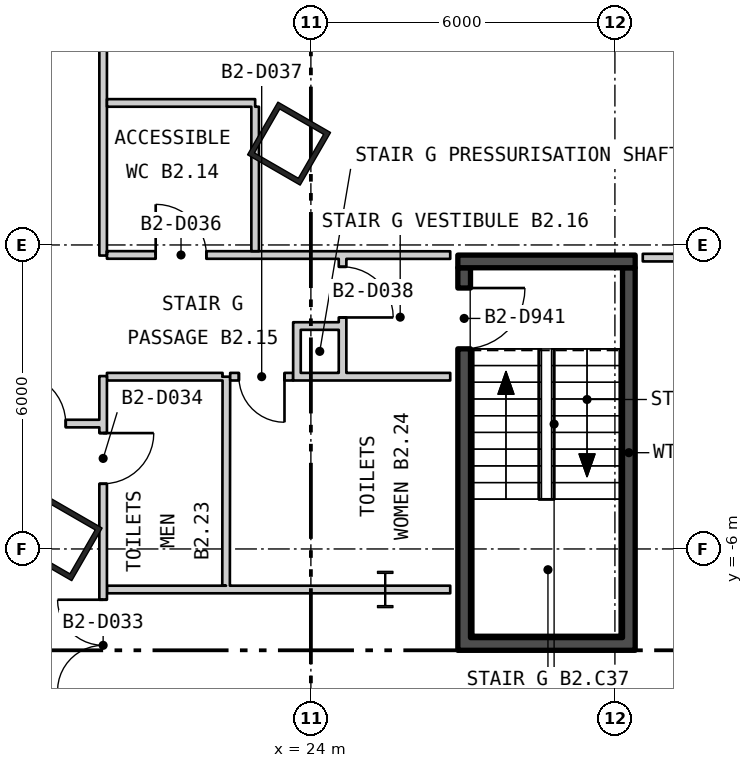
"""IFC4 building model, lengths in metres.
Left out: names, types, materials, properties, quantities, classifications, styles, units other than length and angle.
Written with IfcOpenShell. Run it as: python <this file> out.ifc"""

import sys

from ifc_helpers import new_model, si_unit, direction, frame, frame_2d, origin, origin_2d, place, context, subcontext, project, spatial, rectangle, hollow_rectangle, i_section, extrude, element, fill, save


model = new_model("IFC4")
c1 = context("Model", 3, precision=1e-05, world=origin(), true_north=direction((0.0, 1.0)))
c2 = subcontext(c1, "Body", "Model", "MODEL_VIEW")
j1 = project(units=[si_unit("LENGTHUNIT", "METRE"), si_unit("PLANEANGLEUNIT", "RADIAN")], contexts=[c1])
p1 = place(None, origin())
s1 = spatial("IfcSite", under=j1, at=p1, CompositionType="ELEMENT")
p2 = place(p1, origin())
s2 = spatial("IfcBuilding", under=s1, at=p2, CompositionType="ELEMENT")
p3 = place(p2, frame((0.0, 0.0, -11.4)))
s3 = spatial("IfcBuildingStorey", under=s2, at=p3, CompositionType="ELEMENT", Elevation=-11.4)
for number, where, z_axis, x_axis in (
    (1, (19.061, -5.807, 0.0), (0.0, 0.0, 1.0), (0.5, 0.866, 0.0)),
    (2, (23.569, 2.0, 0.0), (0.0, 0.0, 1.0), (0.5, 0.866, 0.0)),
):
    element("IfcColumn", number, at=place(p3, frame(where, z_axis=z_axis, x_axis=x_axis)), inside=s3, PredefinedType="COLUMN", context=c2, shape_type="SweptSolid", body=[
        extrude(hollow_rectangle(XDim=1.2, YDim=1.2, WallThickness=0.1, at=origin_2d()), origin(), (0.0, 0.0, 1.0), 5.7),
    ])
p4 = place(p3, frame((25.467, -6.8, 0.0), z_axis=(0.0, 0.0, 1.0), x_axis=(1.0, 0.0, 0.0)))
e3 = element("IfcColumn", 3, at=p4, inside=s3, PredefinedType="COLUMN", context=c2, shape_type="SweptSolid", body=[
    extrude(i_section(OverallWidth=0.304, OverallDepth=0.716, WebThickness=0.021, FlangeThickness=0.04, at=origin_2d()), origin(), (0.0, 0.0, 1.0), 5.7),
])
p5 = place(p3, frame((27.025, -7.75, 0.0), z_axis=(0.0, 0.0, 1.0), x_axis=(0.0, 1.0, 0.0)))
e4 = element("IfcWall", 4, at=p5, inside=s3, PredefinedType="SHEAR", context=c2, shape_type="SweptSolid", body=[
    extrude(rectangle(XDim=7.3, YDim=0.25, at=frame_2d((3.65, 0.0))), origin(), (0.0, 0.0, 1.0), 5.25),
])
p6 = place(p5, frame((5.7, 0.0, 0.0)))
e5 = element("IfcOpeningElement", 5, at=p6, cuts=e4, PredefinedType="OPENING", context=c2, shape_type="SweptSolid", body=[
    extrude(rectangle(XDim=1.2, YDim=2.1, at=frame_2d((0.6, 1.05))), frame((0.0, 0.135, 0.0), z_axis=(0.0, -1.0, 0.0), x_axis=(1.0, 0.0, 0.0)), (0.0, 0.0, 1.0), 0.27),
])
p7 = place(p3, frame((30.275, -7.75, 0.0), z_axis=(0.0, 0.0, 1.0), x_axis=(0.0, 1.0, 0.0)))
e6 = element("IfcWall", 6, at=p7, inside=s3, PredefinedType="SHEAR", context=c2, shape_type="SweptSolid", body=[
    extrude(rectangle(XDim=7.3, YDim=0.25, at=frame_2d((3.65, 0.0))), origin(), (0.0, 0.0, 1.0), 5.25),
])
for number, where, z_axis, x_axis in (
    (7, (26.9, -7.875, 0.0), (0.0, 0.0, 1.0), (1.0, 0.0, 0.0)),
    (8, (26.9, -0.325, 0.0), (0.0, 0.0, 1.0), (1.0, 0.0, 0.0)),
):
    element("IfcWall", number, at=place(p3, frame(where, z_axis=z_axis, x_axis=x_axis)), inside=s3, PredefinedType="SHEAR", context=c2, shape_type="SweptSolid", body=[
        extrude(rectangle(XDim=3.5, YDim=0.25, at=frame_2d((1.75, 0.0))), origin(), (0.0, 0.0, 1.0), 5.25),
    ])
p8 = place(p3, frame((17.5, -3.525, 0.0), z_axis=(0.0, 0.0, 1.0), x_axis=(1.0, 0.0, 0.0)))
e9 = element("IfcWall", 9, at=p8, inside=s3, PredefinedType="PARTITIONING", context=c2, shape_type="SweptSolid", body=[
    extrude(rectangle(XDim=2.325, YDim=0.15, at=frame_2d((1.163, 0.0))), origin(), (0.0, 0.0, 1.0), 5.25),
])
p9 = place(p8, frame((0.662, 0.0, 0.0)))
e10 = element("IfcOpeningElement", 10, at=p9, cuts=e9, PredefinedType="OPENING", context=c2, shape_type="SweptSolid", body=[
    extrude(rectangle(XDim=1.0, YDim=2.1, at=frame_2d((0.5, 1.05))), frame((0.0, 0.085, 0.0), z_axis=(0.0, -1.0, 0.0), x_axis=(1.0, 0.0, 0.0)), (0.0, 0.0, 1.0), 0.17),
])
p10 = place(p3, frame((19.9, -23.775, 0.0), z_axis=(0.0, 0.0, 1.0), x_axis=(0.0, 1.0, 0.0)))
e11 = element("IfcWall", 11, at=p10, inside=s3, PredefinedType="PARTITIONING", context=c2, shape_type="SweptSolid", body=[
    extrude(rectangle(XDim=21.187, YDim=0.15, at=frame_2d((10.594, 0.0))), origin(), (0.0, 0.0, 1.0), 5.25),
])
p11 = place(p10, frame((0.275, 0.0, 0.0)))
e12 = element("IfcOpeningElement", 12, at=p11, cuts=e11, PredefinedType="OPENING", context=c2, shape_type="SweptSolid", body=[
    extrude(rectangle(XDim=1.0, YDim=2.1, at=frame_2d((0.5, 1.05))), frame((0.0, 0.085, 0.0), z_axis=(0.0, -1.0, 0.0), x_axis=(1.0, 0.0, 0.0)), (0.0, 0.0, 1.0), 0.17),
])
p12 = place(p10, frame((4.942, 0.0, 0.0)))
e13 = element("IfcOpeningElement", 13, at=p12, cuts=e11, PredefinedType="OPENING", context=c2, shape_type="SweptSolid", body=[
    extrude(rectangle(XDim=1.8, YDim=2.1, at=frame_2d((0.9, 1.05))), frame((0.0, 0.085, 0.0), z_axis=(0.0, -1.0, 0.0), x_axis=(1.0, 0.0, 0.0)), (0.0, 0.0, 1.0), 0.17),
])
p13 = place(p10, frame((9.886, 0.0, 0.0)))
e14 = element("IfcOpeningElement", 14, at=p13, cuts=e11, PredefinedType="OPENING", context=c2, shape_type="SweptSolid", body=[
    extrude(rectangle(XDim=1.8, YDim=2.1, at=frame_2d((0.9, 1.05))), frame((0.0, 0.085, 0.0), z_axis=(0.0, -1.0, 0.0), x_axis=(1.0, 0.0, 0.0)), (0.0, 0.0, 1.0), 0.17),
])
p14 = place(p10, frame((14.973, 0.0, 0.0)))
e15 = element("IfcOpeningElement", 15, at=p14, cuts=e11, PredefinedType="OPENING", context=c2, shape_type="SweptSolid", body=[
    extrude(rectangle(XDim=1.8, YDim=2.1, at=frame_2d((0.9, 1.05))), frame((0.0, 0.085, 0.0), z_axis=(0.0, -1.0, 0.0), x_axis=(1.0, 0.0, 0.0)), (0.0, 0.0, 1.0), 0.17),
])
p15 = place(p10, frame((19.062, 0.0, 0.0)))
e16 = element("IfcOpeningElement", 16, at=p15, cuts=e11, PredefinedType="OPENING", context=c2, shape_type="SweptSolid", body=[
    extrude(rectangle(XDim=1.0, YDim=2.1, at=frame_2d((0.5, 1.05))), frame((0.0, 0.085, 0.0), z_axis=(0.0, -1.0, 0.0), x_axis=(1.0, 0.0, 0.0)), (0.0, 0.0, 1.0), 0.17),
])
p16 = place(p3, frame((19.9, -0.209, 0.0), z_axis=(0.0, 0.0, 1.0), x_axis=(0.0, 1.0, 0.0)))
e17 = element("IfcWall", 17, at=p16, inside=s3, PredefinedType="PARTITIONING", context=c2, shape_type="SweptSolid", body=[
    extrude(rectangle(XDim=18.134, YDim=0.15, at=frame_2d((9.067, 0.0))), origin(), (0.0, 0.0, 1.0), 5.25),
])
p17 = place(p16, frame((9.773, 0.0, 0.0)))
e18 = element("IfcOpeningElement", 18, at=p17, cuts=e17, PredefinedType="OPENING", context=c2, shape_type="SweptSolid", body=[
    extrude(rectangle(XDim=1.0, YDim=2.1, at=frame_2d((0.5, 1.05))), frame((0.0, 0.085, 0.0), z_axis=(0.0, -1.0, 0.0), x_axis=(1.0, 0.0, 0.0)), (0.0, 0.0, 1.0), 0.17),
])
p18 = place(p3, frame((19.975, -6.8, 0.0), z_axis=(0.0, 0.0, 1.0), x_axis=(1.0, 0.0, 0.0)))
e19 = element("IfcWall", 19, at=p18, inside=s3, PredefinedType="PARTITIONING", context=c2, shape_type="SweptSolid", body=[
    extrude(rectangle(XDim=6.775, YDim=0.15, at=frame_2d((3.388, 0.0))), origin(), (0.0, 0.0, 1.0), 5.25),
])
p19 = place(p3, frame((19.975, -2.6, 0.0), z_axis=(0.0, 0.0, 1.0), x_axis=(1.0, 0.0, 0.0)))
e20 = element("IfcWall", 20, at=p19, inside=s3, PredefinedType="PARTITIONING", context=c2, shape_type="SweptSolid", body=[
    extrude(rectangle(XDim=2.282, YDim=0.15, at=frame_2d((1.141, 0.0))), origin(), (0.0, 0.0, 1.0), 5.25),
])
p20 = place(p3, frame((19.975, 2.803, 0.0), z_axis=(0.0, 0.0, 1.0), x_axis=(1.0, 0.0, 0.0)))
e21 = element("IfcWall", 21, at=p20, inside=s3, PredefinedType="PARTITIONING", context=c2, shape_type="SweptSolid", body=[
    extrude(rectangle(XDim=2.925, YDim=0.15, at=frame_2d((1.462, 0.0))), origin(), (0.0, 0.0, 1.0), 5.25),
])
p21 = place(p3, frame((19.975, -0.197, 0.0), z_axis=(0.0, 0.0, 1.0), x_axis=(0.999999901962, -0.000442804385, 0.0)))
e22 = element("IfcWall", 22, at=p21, inside=s3, PredefinedType="PARTITIONING", context=c2, shape_type="SweptSolid", body=[
    extrude(rectangle(XDim=6.775, YDim=0.15, at=frame_2d((3.388, 0.0))), origin(), (0.0, 0.0, 1.0), 5.25),
])
p22 = place(p21, frame((0.962, 0.0, 0.0)))
e23 = element("IfcOpeningElement", 23, at=p22, cuts=e22, PredefinedType="OPENING", context=c2, shape_type="SweptSolid", body=[
    extrude(rectangle(XDim=1.0, YDim=2.1, at=frame_2d((0.5, 1.05))), frame((0.0, 0.085, 0.0), z_axis=(0.0, -1.0, 0.0), x_axis=(1.0, 0.0, 0.0)), (0.0, 0.0, 1.0), 0.17),
])
p23 = place(p3, frame((22.326, -6.725, 0.0), z_axis=(0.0, 0.0, 1.0), x_axis=(0.001454543916, 0.99999894215, 0.0)))
e24 = element("IfcWall", 24, at=p23, inside=s3, PredefinedType="PARTITIONING", context=c2, shape_type="SweptSolid", body=[
    extrude(rectangle(XDim=4.125, YDim=0.15, at=frame_2d((2.062, 0.0))), origin(), (0.0, 0.0, 1.0), 5.25),
])
p24 = place(p3, frame((22.407, -2.6, 0.0), z_axis=(0.0, 0.0, 1.0), x_axis=(1.0, 0.0, 0.0)))
e25 = element("IfcWall", 25, at=p24, inside=s3, PredefinedType="PARTITIONING", context=c2, shape_type="SweptSolid", body=[
    extrude(rectangle(XDim=1.243, YDim=0.15, at=frame_2d((0.622, 0.0))), origin(), (0.0, 0.0, 1.0), 5.25),
])
p25 = place(p24, frame((0.172, 0.0, 0.0)))
e26 = element("IfcOpeningElement", 26, at=p25, cuts=e25, PredefinedType="OPENING", context=c2, shape_type="SweptSolid", body=[
    extrude(rectangle(XDim=0.9, YDim=2.1, at=frame_2d((0.45, 1.05))), frame((0.0, 0.085, 0.0), z_axis=(0.0, -1.0, 0.0), x_axis=(1.0, 0.0, 0.0)), (0.0, 0.0, 1.0), 0.17),
])
p26 = place(p3, frame((22.9, -0.123, 0.0), z_axis=(0.0, 0.0, 1.0), x_axis=(0.0, 1.0, 0.0)))
e27 = element("IfcWall", 27, at=p26, inside=s3, PredefinedType="PARTITIONING", context=c2, shape_type="SweptSolid", body=[
    extrude(rectangle(XDim=2.851, YDim=0.15, at=frame_2d((1.425, 0.0))), origin(), (0.0, 0.0, 1.0), 5.25),
])
p27 = place(p3, frame((23.725, -2.675, 0.0), z_axis=(0.0, 0.0, 1.0), x_axis=(0.0, 1.0, 0.0)))
e28 = element("IfcWall", 28, at=p27, inside=s3, PredefinedType="PARTITIONING", context=c2, shape_type="SweptSolid", body=[
    extrude(rectangle(XDim=1.15, YDim=0.15, at=frame_2d((0.575, 0.0))), origin(), (0.0, 0.0, 1.0), 5.25),
])
for number, where, z_axis, x_axis in (
    (29, (23.8, -2.6, 0.0), (0.0, 0.0, 1.0), (1.0, 0.0, 0.0)),
    (30, (23.8, -1.6, 0.0), (0.0, 0.0, 1.0), (1.0, 0.0, 0.0)),
):
    element("IfcWall", number, at=place(p3, frame(where, z_axis=z_axis, x_axis=x_axis)), inside=s3, PredefinedType="PARTITIONING", context=c2, shape_type="SweptSolid", body=[
        extrude(rectangle(XDim=0.75, YDim=0.15, at=frame_2d((0.375, 0.0))), origin(), (0.0, 0.0, 1.0), 5.25),
    ])
p28 = place(p3, frame((24.625, -2.675, 0.0), z_axis=(0.0, 0.0, 1.0), x_axis=(0.0, 1.0, 0.0)))
e31 = element("IfcWall", 31, at=p28, inside=s3, PredefinedType="PARTITIONING", context=c2, shape_type="SweptSolid", body=[
    extrude(rectangle(XDim=1.087, YDim=0.15, at=frame_2d((0.543, 0.0))), origin(), (0.0, 0.0, 1.0), 5.25),
])
p29 = place(p3, frame((24.625, -1.588, 0.0), z_axis=(0.0, 0.0, 1.0), x_axis=(0.0, 1.0, 0.0)))
e32 = element("IfcWall", 32, at=p29, inside=s3, PredefinedType="PARTITIONING", context=c2, shape_type="SweptSolid", body=[
    extrude(rectangle(XDim=1.314, YDim=0.15, at=frame_2d((0.657, 0.0))), origin(), (0.0, 0.0, 1.0), 5.25),
])
p30 = place(p29, frame((0.157, 0.0, 0.0)))
e33 = element("IfcOpeningElement", 33, at=p30, cuts=e32, PredefinedType="OPENING", context=c2, shape_type="SweptSolid", body=[
    extrude(rectangle(XDim=1.0, YDim=2.1, at=frame_2d((0.5, 1.05))), frame((0.0, 0.085, 0.0), z_axis=(0.0, -1.0, 0.0), x_axis=(1.0, 0.0, 0.0)), (0.0, 0.0, 1.0), 0.17),
])
p31 = place(p3, frame((24.7, -2.6, 0.0), z_axis=(0.0, 0.0, 1.0), x_axis=(1.0, 0.0, 0.0)))
e34 = element("IfcWall", 34, at=p31, inside=s3, PredefinedType="PARTITIONING", context=c2, shape_type="SweptSolid", body=[
    extrude(rectangle(XDim=2.05, YDim=0.15, at=frame_2d((1.025, 0.0))), origin(), (0.0, 0.0, 1.0), 5.25),
])
p32 = place(p3, frame((30.55, -0.25, 0.0), z_axis=(0.0, 0.0, 1.0), x_axis=(1.0, 0.0, 0.0)))
e35 = element("IfcWall", 35, at=p32, inside=s3, PredefinedType="PARTITIONING", context=c2, shape_type="SweptSolid", body=[
    extrude(rectangle(XDim=7.55, YDim=0.15, at=frame_2d((3.775, 0.0))), origin(), (0.0, 0.0, 1.0), 5.25),
])
p33 = place(p6, origin())
e36 = element("IfcDoor", 36, at=p33, inside=s3, OperationType="SINGLE_SWING_RIGHT", PredefinedType="DOOR", context=c2, shape_type="SweptSolid", body=[
    extrude(rectangle(XDim=1.2, YDim=2.1, at=frame_2d((0.6, 1.05))), frame((0.0, 0.025, 0.0), z_axis=(0.0, -1.0, 0.0), x_axis=(1.0, 0.0, 0.0)), (0.0, 0.0, 1.0), 0.05),
])
fill(e5, e36)
p34 = place(p9, origin())
e37 = element("IfcDoor", 37, at=p34, inside=s3, OperationType="SINGLE_SWING_RIGHT", PredefinedType="DOOR", context=c2, shape_type="SweptSolid", body=[
    extrude(rectangle(XDim=1.0, YDim=2.1, at=frame_2d((0.5, 1.05))), frame((0.0, 0.025, 0.0), z_axis=(0.0, -1.0, 0.0), x_axis=(1.0, 0.0, 0.0)), (0.0, 0.0, 1.0), 0.05),
])
fill(e10, e37)
p35 = place(p14, origin())
e38 = element("IfcDoor", 38, at=p35, inside=s3, OperationType="DOUBLE_DOOR_SINGLE_SWING", PredefinedType="DOOR", context=c2, shape_type="SweptSolid", body=[
    extrude(rectangle(XDim=1.8, YDim=2.1, at=frame_2d((0.9, 1.05))), frame((0.0, 0.025, 0.0), z_axis=(0.0, -1.0, 0.0), x_axis=(1.0, 0.0, 0.0)), (0.0, 0.0, 1.0), 0.05),
])
fill(e15, e38)
p36 = place(p15, origin())
e39 = element("IfcDoor", 39, at=p36, inside=s3, OperationType="SINGLE_SWING_RIGHT", PredefinedType="DOOR", context=c2, shape_type="SweptSolid", body=[
    extrude(rectangle(XDim=1.0, YDim=2.1, at=frame_2d((0.5, 1.05))), frame((0.0, 0.025, 0.0), z_axis=(0.0, -1.0, 0.0), x_axis=(1.0, 0.0, 0.0)), (0.0, 0.0, 1.0), 0.05),
])
fill(e16, e39)
p37 = place(p22, origin())
e40 = element("IfcDoor", 40, at=p37, inside=s3, OperationType="SINGLE_SWING_RIGHT", PredefinedType="DOOR", context=c2, shape_type="SweptSolid", body=[
    extrude(rectangle(XDim=1.0, YDim=2.1, at=frame_2d((0.5, 1.05))), frame((0.0, 0.025, 0.0), z_axis=(0.0, -1.0, 0.0), x_axis=(1.0, 0.0, 0.0)), (0.0, 0.0, 1.0), 0.05),
])
fill(e23, e40)
p38 = place(p25, origin())
e41 = element("IfcDoor", 41, at=p38, inside=s3, OperationType="SINGLE_SWING_RIGHT", PredefinedType="DOOR", context=c2, shape_type="SweptSolid", body=[
    extrude(rectangle(XDim=0.9, YDim=2.1, at=frame_2d((0.45, 1.05))), frame((0.0, 0.025, 0.0), z_axis=(0.0, -1.0, 0.0), x_axis=(1.0, 0.0, 0.0)), (0.0, 0.0, 1.0), 0.05),
])
fill(e26, e41)
p39 = place(p30, origin())
e42 = element("IfcDoor", 42, at=p39, inside=s3, OperationType="SINGLE_SWING_LEFT", PredefinedType="DOOR", context=c2, shape_type="SweptSolid", body=[
    extrude(rectangle(XDim=1.0, YDim=2.1, at=frame_2d((0.5, 1.05))), frame((0.0, 0.025, 0.0), z_axis=(0.0, -1.0, 0.0), x_axis=(1.0, 0.0, 0.0)), (0.0, 0.0, 1.0), 0.05),
])
fill(e33, e42)
save(model, sys.argv[1])
